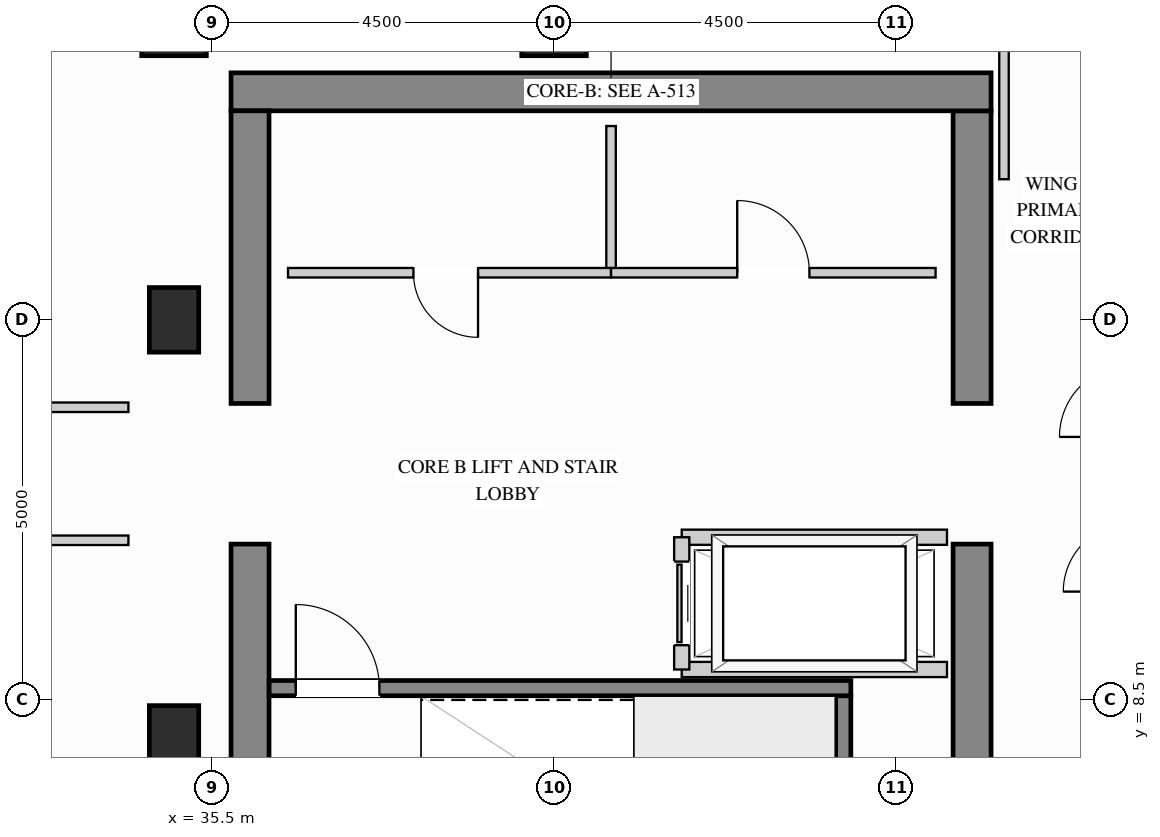
"""IFC4 building model, lengths in metres.
Left out: names, types, materials, properties, quantities, classifications, styles, units other than length and angle.
Written with IfcOpenShell. Run it as: python <this file> out.ifc"""

import sys

from ifc_helpers import new_model, si_unit, direction, frame, frame_2d, origin, origin_2d, place, context, subcontext, project, spatial, rectangle, extrude, source, transform, mapped, element, fill, save


model = new_model("IFC4")
c1 = context("Model", 3, precision=1e-05, world=origin(), true_north=direction((0.0, 1.0)))
c2 = subcontext(c1, "Body", "Model", "MODEL_VIEW")
j1 = project(units=[si_unit("LENGTHUNIT", "METRE"), si_unit("PLANEANGLEUNIT", "RADIAN")], contexts=[c1])
p1 = place(None, origin())
s1 = spatial("IfcSite", under=j1, at=p1, CompositionType="ELEMENT")
p2 = place(p1, origin())
s2 = spatial("IfcBuilding", under=s1, at=p2, CompositionType="ELEMENT")
p3 = place(p2, frame((0.0, 0.0, 216.0)))
s3 = spatial("IfcBuildingStorey", under=s2, at=p3, CompositionType="ELEMENT", Elevation=216.0)
m1 = source(origin(), c2, "Body", "SweptSolid", [
    extrude(rectangle(XDim=0.65, YDim=0.85, at=origin_2d()), origin(), (0.0, 0.0, 1.0), 3.4),
])
for number, where, z_axis, x_axis in (
    (1, (35.0, 13.5, 0.0), (0.0, 0.0, 1.0), (1.0, 0.0, 0.0)),
    (2, (35.0, 8.0, 0.0), (0.0, 0.0, 1.0), (1.0, 0.0, 0.0)),
):
    element("IfcColumn", number, at=place(p3, frame(where, z_axis=z_axis, x_axis=x_axis)), inside=s3, PredefinedType="COLUMN", context=c2, shape_type="MappedRepresentation", body=[
        mapped(m1, transform((0.0, 0.0, 0.0), x_axis=(1.0, 0.0, 0.0), y_axis=(0.0, 1.0, 0.0), z_axis=(0.0, 0.0, 1.0))),
    ])
m2 = source(origin(), c2, "Body", "SweptSolid", [
    extrude(rectangle(XDim=0.85, YDim=0.85, at=origin_2d()), origin(), (0.0, 0.0, 1.0), 3.4),
])
for number, where, z_axis, x_axis in (
    (3, (35.0, 17.4, 0.0), (0.0, 0.0, 1.0), (1.0, 0.0, 0.0)),
    (4, (40.0, 17.4, 0.0), (0.0, 0.0, 1.0), (1.0, 0.0, 0.0)),
):
    element("IfcColumn", number, at=place(p3, frame(where, z_axis=z_axis, x_axis=x_axis)), inside=s3, PredefinedType="COLUMN", context=c2, shape_type="MappedRepresentation", body=[
        mapped(m2, transform((0.0, 0.0, 0.0), x_axis=(1.0, 0.0, 0.0), y_axis=(0.0, 1.0, 0.0), z_axis=(0.0, 0.0, 1.0))),
    ])
m3 = source(origin(), c2, "Body", "SweptSolid", [
    extrude(rectangle(XDim=5.8, YDim=0.5, at=frame_2d((2.9, 0.0))), origin(), (0.0, 0.0, 1.0), 3.4),
])
p4 = place(p3, frame((45.5, 4.75, 0.0), z_axis=(0.0, 0.0, 1.0), x_axis=(0.0, 1.0, 0.0)))
e5 = element("IfcWall", 5, at=p4, inside=s3, PredefinedType="SHEAR", context=c2, shape_type="MappedRepresentation", body=[
    mapped(m3, transform((0.0, 0.0, 0.0), x_axis=(1.0, 0.0, 0.0), y_axis=(0.0, 1.0, 0.0), z_axis=(0.0, 0.0, 1.0))),
])
m4 = source(origin(), c2, "Body", "SweptSolid", [
    extrude(rectangle(XDim=3.85, YDim=0.5, at=frame_2d((1.925, 0.0))), origin(), (0.0, 0.0, 1.0), 3.4),
])
p5 = place(p3, frame((45.5, 12.4, 0.0), z_axis=(0.0, 0.0, 1.0), x_axis=(0.0, 1.0, 0.0)))
e6 = element("IfcWall", 6, at=p5, inside=s3, PredefinedType="SHEAR", context=c2, shape_type="MappedRepresentation", body=[
    mapped(m4, transform((0.0, 0.0, 0.0), x_axis=(1.0, 0.0, 0.0), y_axis=(0.0, 1.0, 0.0), z_axis=(0.0, 0.0, 1.0))),
])
m5 = source(origin(), c2, "Body", "SweptSolid", [
    extrude(rectangle(XDim=10.0, YDim=0.5, at=frame_2d((5.0, 0.0))), origin(), (0.0, 0.0, 1.0), 3.4),
])
p6 = place(p3, frame((35.75, 16.5, 0.0), z_axis=(0.0, 0.0, 1.0), x_axis=(1.0, 0.0, 0.0)))
e7 = element("IfcWall", 7, at=p6, inside=s3, PredefinedType="SHEAR", context=c2, shape_type="MappedRepresentation", body=[
    mapped(m5, transform((0.0, 0.0, 0.0), x_axis=(1.0, 0.0, 0.0), y_axis=(0.0, 1.0, 0.0), z_axis=(0.0, 0.0, 1.0))),
])
p7 = place(p3, frame((36.0, 4.75, 0.0), z_axis=(0.0, 0.0, 1.0), x_axis=(0.0, 1.0, 0.0)))
e8 = element("IfcWall", 8, at=p7, inside=s3, PredefinedType="SHEAR", context=c2, shape_type="MappedRepresentation", body=[
    mapped(m3, transform((0.0, 0.0, 0.0), x_axis=(1.0, 0.0, 0.0), y_axis=(0.0, 1.0, 0.0), z_axis=(0.0, 0.0, 1.0))),
])
p8 = place(p3, frame((36.0, 12.4, 0.0), z_axis=(0.0, 0.0, 1.0), x_axis=(0.0, 1.0, 0.0)))
e9 = element("IfcWall", 9, at=p8, inside=s3, PredefinedType="SHEAR", context=c2, shape_type="MappedRepresentation", body=[
    mapped(m4, transform((0.0, 0.0, 0.0), x_axis=(1.0, 0.0, 0.0), y_axis=(0.0, 1.0, 0.0), z_axis=(0.0, 0.0, 1.0))),
])
m6 = source(origin(), c2, "Body", "SweptSolid", [
    extrude(rectangle(XDim=1.93, YDim=0.125, at=frame_2d((0.965, 0.0))), origin(), (0.0, 0.0, 1.0), 3.385),
])
p9 = place(p3, frame((40.75, 14.12, 0.0), z_axis=(0.0, 0.0, 1.0), x_axis=(0.0, 1.0, 0.0)))
e10 = element("IfcWall", 10, at=p9, inside=s3, PredefinedType="PARTITIONING", context=c2, shape_type="MappedRepresentation", body=[
    mapped(m6, transform((0.0, 0.0, 0.0), x_axis=(1.0, 0.0, 0.0), y_axis=(0.0, 1.0, 0.0), z_axis=(0.0, 0.0, 1.0))),
])
p10 = place(p3, frame((36.5, 14.12, 0.0), z_axis=(0.0, 0.0, 1.0), x_axis=(1.0, 0.0, 0.0)))
e11 = element("IfcWall", 11, at=p10, inside=s3, PredefinedType="PARTITIONING", context=c2, shape_type="SweptSolid", body=[
    extrude(rectangle(XDim=4.25, YDim=0.125, at=frame_2d((2.125, 0.0))), origin(), (0.0, 0.0, 1.0), 3.385),
])
p11 = place(p10, frame((1.65, 0.0, 0.0)))
e12 = element("IfcOpeningElement", 12, at=p11, cuts=e11, PredefinedType="OPENING", context=c2, shape_type="SweptSolid", body=[
    extrude(rectangle(XDim=0.85, YDim=2.1, at=frame_2d((0.425, 1.05))), frame((0.0, 0.073, 0.0), z_axis=(0.0, -1.0, 0.0), x_axis=(1.0, 0.0, 0.0)), (0.0, 0.0, 1.0), 0.145),
])
p12 = place(p3, frame((40.75, 14.12, 0.0), z_axis=(0.0, 0.0, 1.0), x_axis=(1.0, 0.0, 0.0)))
e13 = element("IfcWall", 13, at=p12, inside=s3, PredefinedType="PARTITIONING", context=c2, shape_type="SweptSolid", body=[
    extrude(rectangle(XDim=4.27, YDim=0.125, at=frame_2d((2.135, 0.0))), origin(), (0.0, 0.0, 1.0), 3.385),
])
p13 = place(p12, frame((1.66, 0.0, 0.0)))
e14 = element("IfcOpeningElement", 14, at=p13, cuts=e13, PredefinedType="OPENING", context=c2, shape_type="SweptSolid", body=[
    extrude(rectangle(XDim=0.95, YDim=2.15, at=frame_2d((0.475, 1.075))), frame((0.0, 0.073, 0.0), z_axis=(0.0, -1.0, 0.0), x_axis=(1.0, 0.0, 0.0)), (0.0, 0.0, 1.0), 0.145),
])
m7 = source(origin(), c2, "Body", "SweptSolid", [
    extrude(rectangle(XDim=2.298, YDim=0.125, at=frame_2d((1.149, 0.0))), origin(), (0.0, 0.0, 1.0), 3.385),
])
p14 = place(p3, frame((45.92, 15.35, 0.0), z_axis=(0.0, 0.0, 1.0), x_axis=(0.0, 1.0, 0.0)))
e15 = element("IfcWall", 15, at=p14, inside=s3, PredefinedType="PARTITIONING", context=c2, shape_type="MappedRepresentation", body=[
    mapped(m7, transform((0.0, 0.0, 0.0), x_axis=(1.0, 0.0, 0.0), y_axis=(0.0, 1.0, 0.0), z_axis=(0.0, 0.0, 1.0))),
])
p15 = place(p3, frame((29.85, 12.35, 0.0), z_axis=(0.0, 0.0, 1.0), x_axis=(1.0, 0.0, 0.0)))
e16 = element("IfcWall", 16, at=p15, inside=s3, PredefinedType="PARTITIONING", context=c2, shape_type="SweptSolid", body=[
    extrude(rectangle(XDim=4.55, YDim=0.125, at=frame_2d((2.275, 0.0))), origin(), (0.0, 0.0, 1.0), 3.385),
])
p16 = place(p15, frame((1.8, 0.0, 0.0)))
e17 = element("IfcOpeningElement", 17, at=p16, cuts=e16, PredefinedType="OPENING", context=c2, shape_type="SweptSolid", body=[
    extrude(rectangle(XDim=0.95, YDim=2.15, at=frame_2d((0.475, 1.075))), frame((0.0, 0.073, 0.0), z_axis=(0.0, -1.0, 0.0), x_axis=(1.0, 0.0, 0.0)), (0.0, 0.0, 1.0), 0.145),
])
p17 = place(p3, frame((26.95, 10.6, 0.0), z_axis=(0.0, 0.0, 1.0), x_axis=(1.0, 0.0, 0.0)))
e18 = element("IfcWall", 18, at=p17, inside=s3, PredefinedType="PARTITIONING", context=c2, shape_type="SweptSolid", body=[
    extrude(rectangle(XDim=7.45, YDim=0.125, at=frame_2d((3.725, 0.0))), origin(), (0.0, 0.0, 1.0), 3.385),
])
p18 = place(p17, frame((4.478, 0.0, 0.0)))
e19 = element("IfcOpeningElement", 19, at=p18, cuts=e18, PredefinedType="OPENING", context=c2, shape_type="SweptSolid", body=[
    extrude(rectangle(XDim=0.95, YDim=2.15, at=frame_2d((0.475, 1.075))), frame((0.0, 0.073, 0.0), z_axis=(0.0, -1.0, 0.0), x_axis=(1.0, 0.0, 0.0)), (0.0, 0.0, 1.0), 0.145),
])
m8 = source(origin(), c2, "Body", "SweptSolid", [
    extrude(rectangle(XDim=3.49, YDim=0.2, at=frame_2d((1.745, 0.0))), origin(), (0.0, 0.0, 1.0), 3.385),
])
for number, where, z_axis, x_axis in (
    (20, (41.68, 10.64, 0.0), (0.0, 0.0, 1.0), (1.0, 0.0, 0.0)),
    (21, (41.68, 8.9, 0.0), (0.0, 0.0, 1.0), (1.0, 0.0, 0.0)),
):
    element("IfcWall", number, at=place(p3, frame(where, z_axis=z_axis, x_axis=x_axis)), inside=s3, PredefinedType="PARTITIONING", context=c2, shape_type="MappedRepresentation", body=[
        mapped(m8, transform((0.0, 0.0, 0.0), x_axis=(1.0, 0.0, 0.0), y_axis=(0.0, 1.0, 0.0), z_axis=(0.0, 0.0, 1.0))),
    ])
p19 = place(p3, frame((41.68, 8.9, 0.0), z_axis=(0.0, 0.0, 1.0), x_axis=(0.0, 1.0, 0.0)))
e22 = element("IfcWall", 22, at=p19, inside=s3, PredefinedType="PARTITIONING", context=c2, shape_type="SweptSolid", body=[
    extrude(rectangle(XDim=1.74, YDim=0.2, at=frame_2d((0.87, 0.0))), origin(), (0.0, 0.0, 1.0), 3.385),
])
p20 = place(p19, frame((0.32, 0.0, 0.0)))
e23 = element("IfcOpeningElement", 23, at=p20, cuts=e22, PredefinedType="OPENING", context=c2, shape_type="SweptSolid", body=[
    extrude(rectangle(XDim=1.1, YDim=2.2, at=frame_2d((0.55, 1.1))), frame((0.0, 0.11, 0.0), z_axis=(0.0, -1.0, 0.0), x_axis=(1.0, 0.0, 0.0)), (0.0, 0.0, 1.0), 0.22),
])
m9 = source(origin(), c2, "Body", "SweptSolid", [
    extrude(rectangle(XDim=3.803, YDim=0.2, at=frame_2d((1.901, 0.0))), origin(), (0.0, 0.0, 1.0), 3.4),
])
p21 = place(p3, frame((43.805, 4.752, 0.0), z_axis=(0.0, 0.0, 1.0), x_axis=(0.0, 1.0, 0.0)))
e24 = element("IfcWall", 24, at=p21, inside=s3, PredefinedType="SHEAR", context=c2, shape_type="MappedRepresentation", body=[
    mapped(m9, transform((0.0, 0.0, 0.0), x_axis=(1.0, 0.0, 0.0), y_axis=(0.0, 1.0, 0.0), z_axis=(0.0, 0.0, 1.0))),
])
p22 = place(p3, frame((36.252, 8.655, 0.0), z_axis=(0.0, 0.0, 1.0), x_axis=(1.0, 0.0, 0.0)))
e25 = element("IfcWall", 25, at=p22, inside=s3, PredefinedType="SHEAR", context=c2, shape_type="SweptSolid", body=[
    extrude(rectangle(XDim=7.653, YDim=0.2, at=frame_2d((3.827, 0.0))), origin(), (0.0, 0.0, 1.0), 3.4),
])
p23 = place(p22, frame((0.35, 0.0, 0.0)))
e26 = element("IfcOpeningElement", 26, at=p23, cuts=e25, PredefinedType="OPENING", context=c2, shape_type="SweptSolid", body=[
    extrude(rectangle(XDim=1.1, YDim=2.15, at=frame_2d((0.55, 1.075))), frame((0.0, 0.11, 0.0), z_axis=(0.0, -1.0, 0.0), x_axis=(1.0, 0.0, 0.0)), (0.0, 0.0, 1.0), 0.22),
])
m10 = source(origin(), c2, "Body", "SweptSolid", [
    extrude(rectangle(XDim=1.1, YDim=2.2, at=frame_2d((0.55, 1.1))), frame((0.0, 0.025, 0.0), z_axis=(0.0, -1.0, 0.0), x_axis=(1.0, 0.0, 0.0)), (0.0, 0.0, 1.0), 0.05),
])
p24 = place(p20, origin())
e27 = element("IfcDoor", 27, at=p24, inside=s3, OperationType="SLIDING_TO_LEFT", PredefinedType="DOOR", context=c2, shape_type="MappedRepresentation", body=[
    mapped(m10, transform((0.0, 0.0, 0.0), x_axis=(1.0, 0.0, 0.0), y_axis=(0.0, 1.0, 0.0), z_axis=(0.0, 0.0, 1.0))),
])
fill(e23, e27)
m11 = source(origin(), c2, "Body", "SweptSolid", [
    extrude(rectangle(XDim=0.95, YDim=2.15, at=frame_2d((0.475, 1.075))), frame((0.0, 0.025, 0.0), z_axis=(0.0, -1.0, 0.0), x_axis=(1.0, 0.0, 0.0)), (0.0, 0.0, 1.0), 0.05),
])
p25 = place(p13, origin())
e28 = element("IfcDoor", 28, at=p25, inside=s3, OperationType="SINGLE_SWING_LEFT", PredefinedType="DOOR", context=c2, shape_type="MappedRepresentation", body=[
    mapped(m11, transform((0.0, 0.0, 0.0), x_axis=(1.0, 0.0, 0.0), y_axis=(0.0, 1.0, 0.0), z_axis=(0.0, 0.0, 1.0))),
])
fill(e14, e28)
m12 = source(origin(), c2, "Body", "SweptSolid", [
    extrude(rectangle(XDim=0.85, YDim=2.1, at=frame_2d((0.425, 1.05))), frame((0.0, 0.025, 0.0), z_axis=(0.0, -1.0, 0.0), x_axis=(1.0, 0.0, 0.0)), (0.0, 0.0, 1.0), 0.05),
])
p26 = place(p11, origin())
e29 = element("IfcDoor", 29, at=p26, inside=s3, OperationType="SINGLE_SWING_RIGHT", PredefinedType="DOOR", context=c2, shape_type="MappedRepresentation", body=[
    mapped(m12, transform((0.0, 0.0, 0.0), x_axis=(1.0, 0.0, 0.0), y_axis=(0.0, 1.0, 0.0), z_axis=(0.0, 0.0, 1.0))),
])
fill(e12, e29)
m13 = source(origin(), c2, "Body", "SweptSolid", [
    extrude(rectangle(XDim=1.1, YDim=2.15, at=frame_2d((0.55, 1.075))), frame((0.0, 0.025, 0.0), z_axis=(0.0, -1.0, 0.0), x_axis=(1.0, 0.0, 0.0)), (0.0, 0.0, 1.0), 0.05),
])
p27 = place(p23, origin())
e30 = element("IfcDoor", 30, at=p27, inside=s3, OperationType="SINGLE_SWING_LEFT", PredefinedType="DOOR", context=c2, shape_type="MappedRepresentation", body=[
    mapped(m13, transform((0.0, 0.0, 0.0), x_axis=(1.0, 0.0, 0.0), y_axis=(0.0, 1.0, 0.0), z_axis=(0.0, 0.0, 1.0))),
])
fill(e26, e30)
save(model, sys.argv[1])
